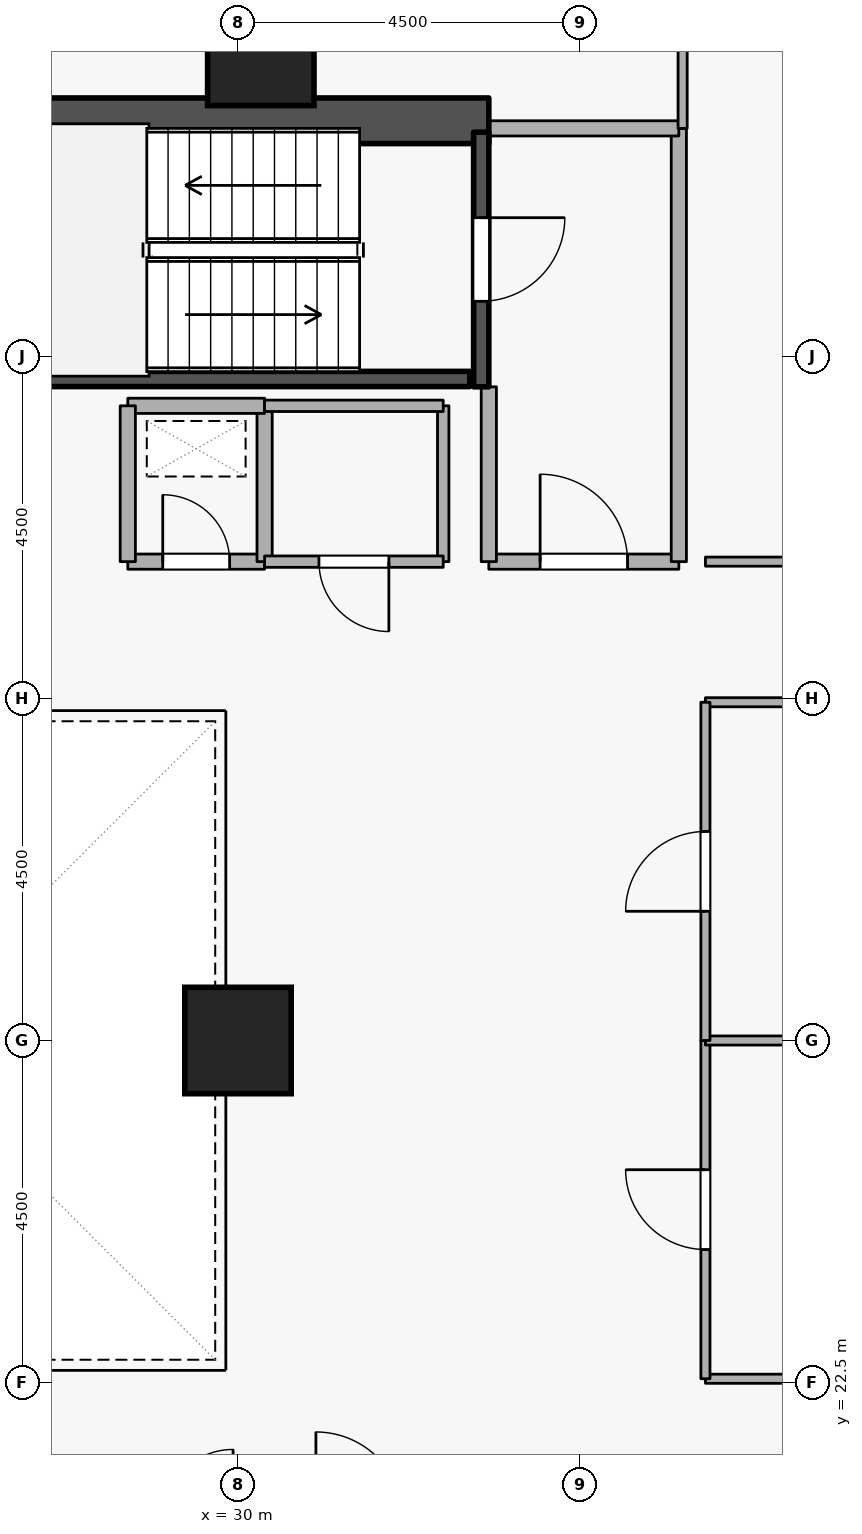
"""IFC4 building model, lengths in metres.
Left out: names, types, materials, properties, quantities, classifications, styles, units other than length and angle.
Written with IfcOpenShell. Run it as: python <this file> out.ifc"""

import sys

from ifc_helpers import new_model, si_unit, direction, frame, frame_2d, origin, origin_2d, place, context, subcontext, project, spatial, rectangle, extrude, element, fill, save


model = new_model("IFC4")
c1 = context("Model", 3, precision=1e-05, world=origin(), true_north=direction((0.0, 1.0)))
c2 = subcontext(c1, "Body", "Model", "MODEL_VIEW")
j1 = project(units=[si_unit("LENGTHUNIT", "METRE"), si_unit("PLANEANGLEUNIT", "RADIAN")], contexts=[c1])
p1 = place(None, origin())
s1 = spatial("IfcSite", under=j1, at=p1, CompositionType="ELEMENT")
p2 = place(p1, origin())
s2 = spatial("IfcBuilding", under=s1, at=p2, CompositionType="ELEMENT")
p3 = place(p2, frame((0.0, 0.0, 27.9)))
s3 = spatial("IfcBuildingStorey", under=s2, at=p3, CompositionType="ELEMENT", Elevation=27.9)
p4 = place(p3, frame((17.7, 39.1, 0.0), z_axis=(0.0, 0.0, 1.0), x_axis=(1.0, 0.0, 0.0)))
e1 = element("IfcWall", 1, at=p4, inside=s3, PredefinedType="SHEAR", context=c2, shape_type="SweptSolid", body=[
    extrude(rectangle(XDim=15.6, YDim=0.6, at=frame_2d((7.8, 0.0))), origin(), (0.0, 0.0, 1.0), 3.6),
])
for number, where, z_axis, x_axis in (
    (2, (30.3, 40.0, 0.0), (0.0, 0.0, 1.0), (1.0, 0.0, 0.0)),
    (3, (30.0, 27.0, 0.0), (0.0, 0.0, 1.0), (1.0, 0.0, 0.0)),
):
    element("IfcColumn", number, at=place(p3, frame(where, z_axis=z_axis, x_axis=x_axis)), inside=s3, PredefinedType="COLUMN", context=c2, shape_type="SweptSolid", body=[
        extrude(rectangle(XDim=1.4, YDim=1.4, at=origin_2d()), origin(), (0.0, 0.0, 1.0), 3.6),
    ])
p5 = place(p3, frame((33.2, 38.95, 0.0), z_axis=(0.0, 0.0, 1.0), x_axis=(0.0, -1.0, 0.0)))
e4 = element("IfcWall", 4, at=p5, inside=s3, PredefinedType="SHEAR", context=c2, shape_type="SweptSolid", body=[
    extrude(rectangle(XDim=3.35, YDim=0.2, at=frame_2d((1.675, 0.0))), origin(), (0.0, 0.0, 1.0), 3.6),
])
p6 = place(p5, frame((1.125, 0.0, 0.0)))
e5 = element("IfcOpeningElement", 5, at=p6, cuts=e4, PredefinedType="OPENING", context=c2, shape_type="SweptSolid", body=[
    extrude(rectangle(XDim=1.1, YDim=2.1, at=frame_2d((0.55, 1.05))), frame((0.0, 0.11, 0.0), z_axis=(0.0, -1.0, 0.0), x_axis=(1.0, 0.0, 0.0)), (0.0, 0.0, 1.0), 0.22),
])
p7 = place(p3, frame((25.95, 35.703, 0.0), z_axis=(0.0, 0.0, 1.0), x_axis=(1.0, 0.0, 0.0)))
e6 = element("IfcWall", 6, at=p7, inside=s3, PredefinedType="SHEAR", context=c2, shape_type="SweptSolid", body=[
    extrude(rectangle(XDim=7.1, YDim=0.2, at=frame_2d((3.55, 0.0))), origin(), (0.0, 0.0, 1.0), 3.6),
])
p8 = place(p3, frame((33.3, 33.3, 0.0), z_axis=(0.0, 0.0, 1.0), x_axis=(1.0, 0.0, 0.0)))
e7 = element("IfcWall", 7, at=p8, inside=s3, PredefinedType="STANDARD", context=c2, shape_type="SweptSolid", body=[
    extrude(rectangle(XDim=2.5, YDim=0.2, at=frame_2d((1.25, 0.0))), origin(), (0.0, 0.0, 1.0), 3.34),
])
p9 = place(p8, frame((0.675, 0.0, 0.0)))
e8 = element("IfcOpeningElement", 8, at=p9, cuts=e7, PredefinedType="OPENING", context=c2, shape_type="SweptSolid", body=[
    extrude(rectangle(XDim=1.15, YDim=2.1, at=frame_2d((0.575, 1.05))), frame((0.0, 0.11, 0.0), z_axis=(0.0, -1.0, 0.0), x_axis=(1.0, 0.0, 0.0)), (0.0, 0.0, 1.0), 0.22),
])
p10 = place(p3, frame((35.8, 33.3, 0.0), z_axis=(0.0, 0.0, 1.0), x_axis=(0.0, 1.0, 0.0)))
e9 = element("IfcWall", 9, at=p10, inside=s3, PredefinedType="STANDARD", context=c2, shape_type="SweptSolid", body=[
    extrude(rectangle(XDim=5.7, YDim=0.2, at=frame_2d((2.85, 0.0))), origin(), (0.0, 0.0, 1.0), 3.34),
])
p11 = place(p3, frame((35.8, 39.0, 0.0), z_axis=(0.0, 0.0, 1.0), x_axis=(-1.0, 0.0, 0.0)))
e10 = element("IfcWall", 10, at=p11, inside=s3, PredefinedType="STANDARD", context=c2, shape_type="SweptSolid", body=[
    extrude(rectangle(XDim=2.5, YDim=0.2, at=frame_2d((1.25, 0.0))), origin(), (0.0, 0.0, 1.0), 3.34),
])
p12 = place(p3, frame((33.3, 35.6, 0.0), z_axis=(0.0, 0.0, 1.0), x_axis=(0.0, -1.0, 0.0)))
e11 = element("IfcWall", 11, at=p12, inside=s3, PredefinedType="STANDARD", context=c2, shape_type="SweptSolid", body=[
    extrude(rectangle(XDim=2.3, YDim=0.2, at=frame_2d((1.15, 0.0))), origin(), (0.0, 0.0, 1.0), 2.545),
])
p13 = place(p3, frame((28.55, 33.3, 0.0), z_axis=(0.0, 0.0, 1.0), x_axis=(1.0, 0.0, 0.0)))
e12 = element("IfcWall", 12, at=p13, inside=s3, PredefinedType="STANDARD", context=c2, shape_type="SweptSolid", body=[
    extrude(rectangle(XDim=1.8, YDim=0.2, at=frame_2d((0.9, 0.0))), origin(), (0.0, 0.0, 1.0), 3.34),
])
p14 = place(p13, frame((0.46, 0.0, 0.0)))
e13 = element("IfcOpeningElement", 13, at=p14, cuts=e12, PredefinedType="OPENING", context=c2, shape_type="SweptSolid", body=[
    extrude(rectangle(XDim=0.88, YDim=2.04, at=frame_2d((0.44, 1.02))), frame((0.0, 0.11, 0.0), z_axis=(0.0, -1.0, 0.0), x_axis=(1.0, 0.0, 0.0)), (0.0, 0.0, 1.0), 0.22),
])
p15 = place(p3, frame((30.35, 33.3, 0.0), z_axis=(0.0, 0.0, 1.0), x_axis=(0.0, 1.0, 0.0)))
e14 = element("IfcWall", 14, at=p15, inside=s3, PredefinedType="STANDARD", context=c2, shape_type="SweptSolid", body=[
    extrude(rectangle(XDim=2.05, YDim=0.2, at=frame_2d((1.025, 0.0))), origin(), (0.0, 0.0, 1.0), 3.34),
])
p16 = place(p3, frame((30.35, 35.35, 0.0), z_axis=(0.0, 0.0, 1.0), x_axis=(-1.0, 0.0, 0.0)))
e15 = element("IfcWall", 15, at=p16, inside=s3, PredefinedType="STANDARD", context=c2, shape_type="SweptSolid", body=[
    extrude(rectangle(XDim=1.8, YDim=0.2, at=frame_2d((0.9, 0.0))), origin(), (0.0, 0.0, 1.0), 3.34),
])
p17 = place(p3, frame((28.55, 35.35, 0.0), z_axis=(0.0, 0.0, 1.0), x_axis=(0.0, -1.0, 0.0)))
e16 = element("IfcWall", 16, at=p17, inside=s3, PredefinedType="STANDARD", context=c2, shape_type="SweptSolid", body=[
    extrude(rectangle(XDim=2.05, YDim=0.2, at=frame_2d((1.025, 0.0))), origin(), (0.0, 0.0, 1.0), 3.34),
])
p18 = place(p3, frame((32.7, 35.35, 0.0), z_axis=(0.0, 0.0, 1.0), x_axis=(0.0, -1.0, 0.0)))
e17 = element("IfcWall", 17, at=p18, inside=s3, PredefinedType="PARTITIONING", context=c2, shape_type="SweptSolid", body=[
    extrude(rectangle(XDim=2.05, YDim=0.15, at=frame_2d((1.025, 0.0))), origin(), (0.0, 0.0, 1.0), 2.545),
])
p19 = place(p3, frame((32.7, 33.3, 0.0), z_axis=(0.0, 0.0, 1.0), x_axis=(-1.0, 0.0, 0.0)))
e18 = element("IfcWall", 18, at=p19, inside=s3, PredefinedType="PARTITIONING", context=c2, shape_type="SweptSolid", body=[
    extrude(rectangle(XDim=2.35, YDim=0.15, at=frame_2d((1.175, 0.0))), origin(), (0.0, 0.0, 1.0), 3.34),
])
p20 = place(p19, frame((0.715, 0.0, 0.0)))
e19 = element("IfcOpeningElement", 19, at=p20, cuts=e18, PredefinedType="OPENING", context=c2, shape_type="SweptSolid", body=[
    extrude(rectangle(XDim=0.92, YDim=2.08, at=frame_2d((0.46, 1.04))), frame((0.0, 0.085, 0.0), z_axis=(0.0, -1.0, 0.0), x_axis=(1.0, 0.0, 0.0)), (0.0, 0.0, 1.0), 0.17),
])
p21 = place(p3, frame((30.35, 35.35, 0.0), z_axis=(0.0, 0.0, 1.0), x_axis=(1.0, 0.0, 0.0)))
e20 = element("IfcWall", 20, at=p21, inside=s3, PredefinedType="PARTITIONING", context=c2, shape_type="SweptSolid", body=[
    extrude(rectangle(XDim=2.35, YDim=0.15, at=frame_2d((1.175, 0.0))), origin(), (0.0, 0.0, 1.0), 3.34),
])
p22 = place(p3, frame((37.75, 22.55, 0.0), z_axis=(0.0, 0.0, 1.0), x_axis=(-1.0, 0.0, 0.0)))
e21 = element("IfcWall", 21, at=p22, inside=s3, PredefinedType="PARTITIONING", context=c2, shape_type="SweptSolid", body=[
    extrude(rectangle(XDim=1.6, YDim=0.12, at=frame_2d((0.8, 0.0))), origin(), (0.0, 0.0, 1.0), 3.34),
])
p23 = place(p3, frame((36.15, 22.55, 0.0), z_axis=(0.0, 0.0, 1.0), x_axis=(0.0, 1.0, 0.0)))
e22 = element("IfcWall", 22, at=p23, inside=s3, PredefinedType="PARTITIONING", context=c2, shape_type="SweptSolid", body=[
    extrude(rectangle(XDim=4.45, YDim=0.12, at=frame_2d((2.225, 0.0))), origin(), (0.0, 0.0, 1.0), 3.34),
])
p24 = place(p23, frame((1.7, 0.0, 0.0)))
e23 = element("IfcOpeningElement", 23, at=p24, cuts=e22, PredefinedType="OPENING", context=c2, shape_type="SweptSolid", body=[
    extrude(rectangle(XDim=1.05, YDim=2.1, at=frame_2d((0.525, 1.05))), frame((0.0, 0.07, 0.0), z_axis=(0.0, -1.0, 0.0), x_axis=(1.0, 0.0, 0.0)), (0.0, 0.0, 1.0), 0.14),
])
p25 = place(p3, frame((36.15, 27.0, 0.0), z_axis=(0.0, 0.0, 1.0), x_axis=(1.0, 0.0, 0.0)))
e24 = element("IfcWall", 24, at=p25, inside=s3, PredefinedType="PARTITIONING", context=c2, shape_type="SweptSolid", body=[
    extrude(rectangle(XDim=7.57, YDim=0.12, at=frame_2d((3.785, 0.0))), origin(), (0.0, 0.0, 1.0), 2.878),
])
for number, where, z_axis, x_axis in (
    (25, (36.15, 31.45, 0.0), (0.0, 0.0, 1.0), (1.0, 0.0, 0.0)),
    (26, (37.75, 33.3, 0.0), (0.0, 0.0, 1.0), (-1.0, 0.0, 0.0)),
):
    element("IfcWall", number, at=place(p3, frame(where, z_axis=z_axis, x_axis=x_axis)), inside=s3, PredefinedType="PARTITIONING", context=c2, shape_type="SweptSolid", body=[
        extrude(rectangle(XDim=1.6, YDim=0.12, at=frame_2d((0.8, 0.0))), origin(), (0.0, 0.0, 1.0), 3.34),
    ])
p26 = place(p3, frame((35.85, 39.0, 0.0), z_axis=(0.0, 0.0, 1.0), x_axis=(0.0, 1.0, 0.0)))
e27 = element("IfcWall", 27, at=p26, inside=s3, PredefinedType="PARTITIONING", context=c2, shape_type="SweptSolid", body=[
    extrude(rectangle(XDim=6.22, YDim=0.12, at=frame_2d((3.11, 0.0))), origin(), (0.0, 0.0, 1.0), 3.34),
])
p27 = place(p3, frame((36.15, 27.0, 0.0), z_axis=(0.0, 0.0, 1.0), x_axis=(0.0, 1.0, 0.0)))
e28 = element("IfcWall", 28, at=p27, inside=s3, PredefinedType="PARTITIONING", context=c2, shape_type="SweptSolid", body=[
    extrude(rectangle(XDim=4.45, YDim=0.12, at=frame_2d((2.225, 0.0))), origin(), (0.0, 0.0, 1.0), 3.34),
])
p28 = place(p27, frame((1.7, 0.0, 0.0)))
e29 = element("IfcOpeningElement", 29, at=p28, cuts=e28, PredefinedType="OPENING", context=c2, shape_type="SweptSolid", body=[
    extrude(rectangle(XDim=1.05, YDim=2.1, at=frame_2d((0.525, 1.05))), frame((0.0, 0.07, 0.0), z_axis=(0.0, -1.0, 0.0), x_axis=(1.0, 0.0, 0.0)), (0.0, 0.0, 1.0), 0.14),
])
p29 = place(p6, origin())
e30 = element("IfcDoor", 30, at=p29, inside=s3, OperationType="SINGLE_SWING_LEFT", PredefinedType="DOOR", context=c2, shape_type="SweptSolid", body=[
    extrude(rectangle(XDim=1.1, YDim=2.1, at=frame_2d((0.55, 1.05))), frame((0.0, 0.025, 0.0), z_axis=(0.0, -1.0, 0.0), x_axis=(1.0, 0.0, 0.0)), (0.0, 0.0, 1.0), 0.05),
])
fill(e5, e30)
p30 = place(p9, origin())
e31 = element("IfcDoor", 31, at=p30, inside=s3, OperationType="SINGLE_SWING_LEFT", PredefinedType="DOOR", context=c2, shape_type="SweptSolid", body=[
    extrude(rectangle(XDim=1.15, YDim=2.1, at=frame_2d((0.575, 1.05))), frame((0.0, 0.025, 0.0), z_axis=(0.0, -1.0, 0.0), x_axis=(1.0, 0.0, 0.0)), (0.0, 0.0, 1.0), 0.05),
])
fill(e8, e31)
p31 = place(p14, origin())
e32 = element("IfcDoor", 32, at=p31, inside=s3, OperationType="SINGLE_SWING_LEFT", PredefinedType="DOOR", context=c2, shape_type="SweptSolid", body=[
    extrude(rectangle(XDim=0.88, YDim=2.04, at=frame_2d((0.44, 1.02))), frame((0.0, 0.025, 0.0), z_axis=(0.0, -1.0, 0.0), x_axis=(1.0, 0.0, 0.0)), (0.0, 0.0, 1.0), 0.05),
])
fill(e13, e32)
p32 = place(p20, origin())
e33 = element("IfcDoor", 33, at=p32, inside=s3, OperationType="SINGLE_SWING_LEFT", PredefinedType="DOOR", context=c2, shape_type="SweptSolid", body=[
    extrude(rectangle(XDim=0.92, YDim=2.08, at=frame_2d((0.46, 1.04))), frame((0.0, 0.025, 0.0), z_axis=(0.0, -1.0, 0.0), x_axis=(1.0, 0.0, 0.0)), (0.0, 0.0, 1.0), 0.05),
])
fill(e19, e33)
p33 = place(p24, origin())
e34 = element("IfcDoor", 34, at=p33, inside=s3, OperationType="SINGLE_SWING_RIGHT", PredefinedType="DOOR", context=c2, shape_type="SweptSolid", body=[
    extrude(rectangle(XDim=1.05, YDim=2.1, at=frame_2d((0.525, 1.05))), frame((0.0, 0.025, 0.0), z_axis=(0.0, -1.0, 0.0), x_axis=(1.0, 0.0, 0.0)), (0.0, 0.0, 1.0), 0.05),
])
fill(e23, e34)
p34 = place(p28, origin())
e35 = element("IfcDoor", 35, at=p34, inside=s3, OperationType="SINGLE_SWING_LEFT", PredefinedType="DOOR", context=c2, shape_type="SweptSolid", body=[
    extrude(rectangle(XDim=1.05, YDim=2.1, at=frame_2d((0.525, 1.05))), frame((0.0, 0.025, 0.0), z_axis=(0.0, -1.0, 0.0), x_axis=(1.0, 0.0, 0.0)), (0.0, 0.0, 1.0), 0.05),
])
fill(e29, e35)
save(model, sys.argv[1])
